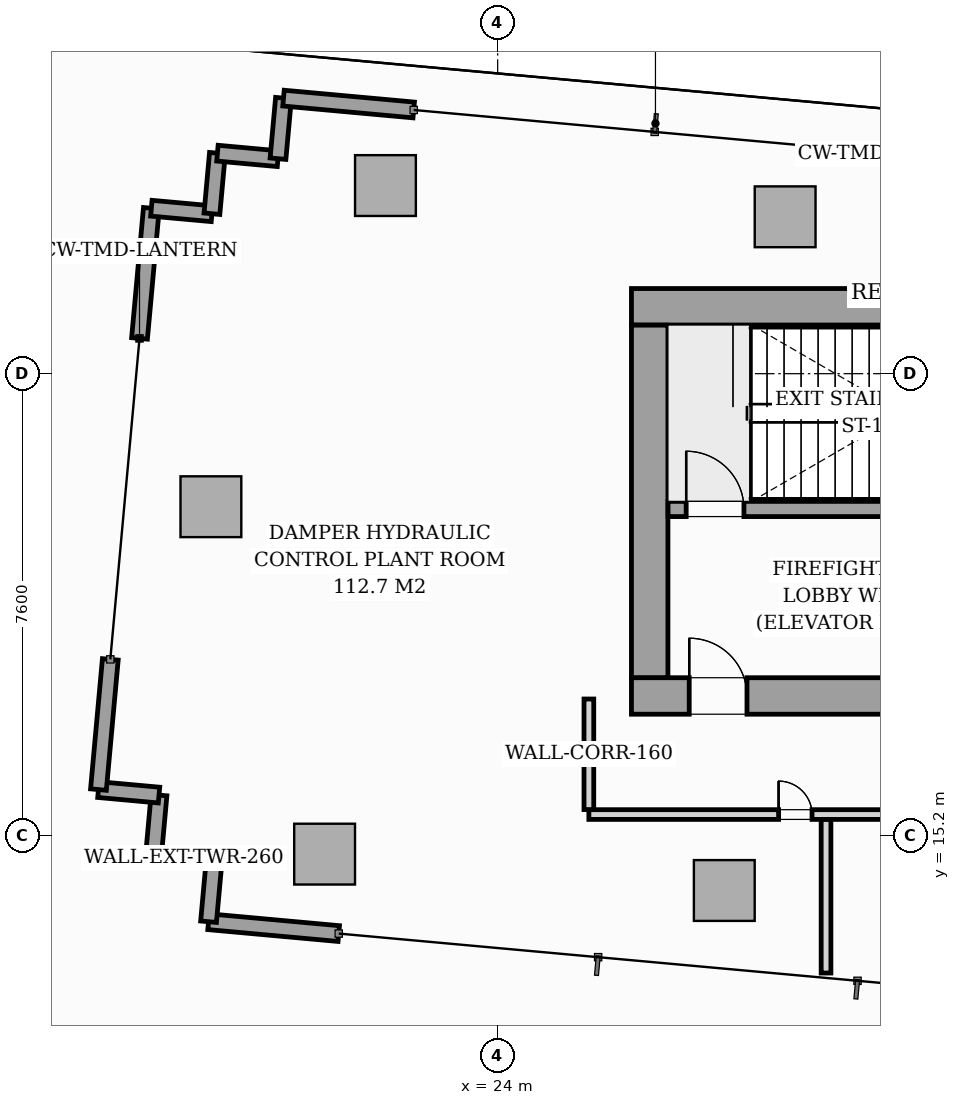
"""IFC4 building model, lengths in metres.
Left out: names, types, materials, properties, quantities, classifications, styles, units other than length and angle.
Written with IfcOpenShell. Run it as: python <this file> out.ifc"""

import sys

from ifc_helpers import new_model, si_unit, direction, frame, frame_2d, origin, origin_2d, place, context, subcontext, project, spatial, rectangle, i_section, extrude, source, transform, mapped, element, fill, save


model = new_model("IFC4")
c1 = context("Model", 3, precision=1e-05, world=origin(), true_north=direction((0.0, 1.0)))
c2 = subcontext(c1, "Body", "Model", "MODEL_VIEW")
j1 = project(units=[si_unit("LENGTHUNIT", "METRE"), si_unit("PLANEANGLEUNIT", "RADIAN")], contexts=[c1])
p1 = place(None, origin())
s1 = spatial("IfcSite", under=j1, at=p1, CompositionType="ELEMENT")
p2 = place(p1, origin())
s2 = spatial("IfcBuilding", under=s1, at=p2, CompositionType="ELEMENT")
p3 = place(p2, frame((0.0, 0.0, 264.3)))
s3 = spatial("IfcBuildingStorey", under=s2, at=p3, CompositionType="ELEMENT", Elevation=264.3)
m1 = source(origin(), c2, "Body", "SweptSolid", [
    extrude(i_section(OverallWidth=0.404, OverallDepth=0.407, WebThickness=0.027, FlangeThickness=0.044, FilletRadius=0.018, at=origin_2d()), origin(), (0.0, 0.0, 1.0), 6.496),
])
for number, where, z_axis, x_axis in (
    (1, (26.4, 17.4, 0.002), (0.0, 0.0, 1.0), (1.0, 0.0, 0.0)),
    (2, (26.4, 24.0, 0.002), (0.0, 0.0, 1.0), (1.0, 0.0, 0.0)),
):
    element("IfcColumn", number, at=place(p3, frame(where, z_axis=z_axis, x_axis=x_axis)), inside=s3, PredefinedType="PILASTER", context=c2, shape_type="MappedRepresentation", body=[
        mapped(m1, transform((0.0, 0.0, 0.0), scale=1.0)),
    ])
m2 = source(origin(), c2, "Body", "SweptSolid", [
    extrude(rectangle(XDim=1.0, YDim=1.0, at=origin_2d()), origin(), (0.0, 0.0, 1.0), 6.494),
])
for number, where, z_axis, x_axis in (
    (3, (21.154, 14.899, 0.004), (0.0, 0.0, 1.0), (0.996, -0.091, 0.0)),
    (4, (27.727, 14.301, 0.004), (0.0, 0.0, 1.0), (0.996, -0.091, 0.0)),
    (5, (22.155, 25.894, 0.004), (0.0, 0.0, 1.0), (0.996, -0.091, 0.0)),
    (6, (28.728, 25.38, 0.004), (0.0, 0.0, 1.0), (0.996, -0.091, 0.0)),
    (7, (19.284, 20.612, 0.004), (0.0, 0.0, 1.0), (0.996, -0.091, 0.0)),
):
    element("IfcColumn", number, at=place(p3, frame(where, z_axis=z_axis, x_axis=x_axis)), inside=s3, PredefinedType="COLUMN", context=c2, shape_type="MappedRepresentation", body=[
        mapped(m2, transform((0.0, 0.0, 0.0), scale=1.0)),
    ])
p4 = place(p3, frame((19.336, 14.783, 0.0), z_axis=(0.0, 0.0, 1.0), x_axis=(-0.995891205479, 0.090557754224, 0.0)))
e8 = element("IfcWall", 8, at=p4, inside=s3, PredefinedType="STANDARD", context=c2, shape_type="SweptSolid", body=[
    extrude(rectangle(XDim=1.0, YDim=0.26, at=frame_2d((0.5, 0.0))), origin(), (0.0, 0.0, 1.0), 6.2),
])
p5 = place(p3, frame((18.34, 14.874, 0.0), z_axis=(0.0, 0.0, 1.0), x_axis=(0.090821912176, 0.995867149909, 0.0)))
e9 = element("IfcWall", 9, at=p5, inside=s3, PredefinedType="STANDARD", context=c2, shape_type="SweptSolid", body=[
    extrude(rectangle(XDim=1.0, YDim=0.26, at=frame_2d((0.5, 0.0))), origin(), (0.0, 0.0, 1.0), 6.2),
])
p6 = place(p3, frame((18.431, 15.87, 0.0), z_axis=(0.0, 0.0, 1.0), x_axis=(-0.995891205479, 0.090557754224, 0.0)))
e10 = element("IfcWall", 10, at=p6, inside=s3, PredefinedType="STANDARD", context=c2, shape_type="SweptSolid", body=[
    extrude(rectangle(XDim=1.0, YDim=0.26, at=frame_2d((0.5, 0.0))), origin(), (0.0, 0.0, 1.0), 6.2),
])
p7 = place(p3, frame((17.435, 15.96, 0.0), z_axis=(0.0, 0.0, 1.0), x_axis=(0.090720017492, 0.995876437329, 0.0)))
e11 = element("IfcWall", 11, at=p7, inside=s3, PredefinedType="STANDARD", context=c2, shape_type="SweptSolid", body=[
    extrude(rectangle(XDim=2.15, YDim=0.26, at=frame_2d((1.075, 0.0))), origin(), (0.0, 0.0, 1.0), 6.2),
])
p8 = place(p3, frame((18.11, 23.38, 0.0), z_axis=(0.0, 0.0, 1.0), x_axis=(0.090617654952, 0.995885756807, 0.0)))
e12 = element("IfcWall", 12, at=p8, inside=s3, PredefinedType="STANDARD", context=c2, shape_type="SweptSolid", body=[
    extrude(rectangle(XDim=2.15, YDim=0.26, at=frame_2d((1.075, 0.0))), origin(), (0.0, 0.0, 1.0), 6.2),
])
for number, where, z_axis, x_axis in (
    (13, (18.305, 25.521, 0.0), (0.0, 0.0, 1.0), (0.996, -0.091, 0.0)),
    (14, (19.301, 25.43, 0.0), (0.0, 0.0, 1.0), (0.091, 0.996, 0.0)),
    (15, (19.392, 26.426, 0.0), (0.0, 0.0, 1.0), (0.996, -0.091, 0.0)),
    (16, (20.387, 26.336, 0.0), (0.0, 0.0, 1.0), (0.091, 0.996, 0.0)),
):
    element("IfcWall", number, at=place(p3, frame(where, z_axis=z_axis, x_axis=x_axis)), inside=s3, PredefinedType="STANDARD", context=c2, shape_type="SweptSolid", body=[
        extrude(rectangle(XDim=1.0, YDim=0.26, at=frame_2d((0.5, 0.0))), origin(), (0.0, 0.0, 1.0), 6.2),
    ])
p9 = place(p3, frame((20.478, 27.332, 0.0), z_axis=(0.0, 0.0, 1.0), x_axis=(0.995885756807, -0.090617654952, 0.0)))
e17 = element("IfcWall", 17, at=p9, inside=s3, PredefinedType="STANDARD", context=c2, shape_type="SweptSolid", body=[
    extrude(rectangle(XDim=2.15, YDim=0.26, at=frame_2d((1.075, 0.0))), origin(), (0.0, 0.0, 1.0), 6.2),
])
p10 = place(p3, frame((21.387, 13.593, 0.0), z_axis=(0.0, 0.0, 1.0), x_axis=(-0.995876437329, 0.090720017492, 0.0)))
e18 = element("IfcWall", 18, at=p10, inside=s3, PredefinedType="STANDARD", context=c2, shape_type="SweptSolid", body=[
    extrude(rectangle(XDim=2.15, YDim=0.26, at=frame_2d((1.075, 0.0))), origin(), (0.0, 0.0, 1.0), 6.2),
])
p11 = place(p3, frame((19.245, 13.788, 0.0), z_axis=(0.0, 0.0, 1.0), x_axis=(0.090821912176, 0.995867149909, 0.0)))
e19 = element("IfcWall", 19, at=p11, inside=s3, PredefinedType="STANDARD", context=c2, shape_type="SweptSolid", body=[
    extrude(rectangle(XDim=1.0, YDim=0.26, at=frame_2d((0.5, 0.0))), origin(), (0.0, 0.0, 1.0), 6.2),
])
p12 = place(p3, frame((26.2, 17.5, 0.0), z_axis=(0.0, 0.0, 1.0), x_axis=(1.0, 0.0, 0.0)))
e20 = element("IfcWall", 20, at=p12, inside=s3, PredefinedType="SHEAR", context=c2, shape_type="SweptSolid", body=[
    extrude(rectangle(XDim=19.6, YDim=0.6, at=frame_2d((9.8, 0.0))), origin(), (0.0, 0.0, 1.0), 6.5),
])
p13 = place(p12, frame((0.95, 0.0, 0.0)))
e21 = element("IfcOpeningElement", 21, at=p13, cuts=e20, PredefinedType="OPENING", context=c2, shape_type="SweptSolid", body=[
    extrude(rectangle(XDim=0.95, YDim=2.06, at=frame_2d((0.475, 1.03))), frame((0.0, 0.31, 0.0), z_axis=(0.0, -1.0, 0.0), x_axis=(1.0, 0.0, 0.0)), (0.0, 0.0, 1.0), 0.62),
])
p14 = place(p12, frame((9.38, 0.0, 0.0)))
e22 = element("IfcOpeningElement", 22, at=p14, cuts=e20, PredefinedType="OPENING", context=c2, shape_type="SweptSolid", body=[
    extrude(rectangle(XDim=0.9, YDim=2.06, at=frame_2d((0.45, 1.03))), frame((0.0, 0.31, 0.0), z_axis=(0.0, -1.0, 0.0), x_axis=(1.0, 0.0, 0.0)), (0.0, 0.0, 1.0), 0.62),
])
p15 = place(p12, frame((17.55, 0.0, 0.0)))
e23 = element("IfcOpeningElement", 23, at=p15, cuts=e20, PredefinedType="OPENING", context=c2, shape_type="SweptSolid", body=[
    extrude(rectangle(XDim=0.95, YDim=2.06, at=frame_2d((0.475, 1.03))), frame((0.0, 0.31, 0.0), z_axis=(0.0, -1.0, 0.0), x_axis=(1.0, 0.0, 0.0)), (0.0, 0.0, 1.0), 0.62),
])
p16 = place(p3, frame((26.2, 23.9, 0.0), z_axis=(0.0, 0.0, 1.0), x_axis=(1.0, 0.0, 0.0)))
e24 = element("IfcWall", 24, at=p16, inside=s3, PredefinedType="SHEAR", context=c2, shape_type="SweptSolid", body=[
    extrude(rectangle(XDim=19.6, YDim=0.6, at=frame_2d((9.8, 0.0))), origin(), (0.0, 0.0, 1.0), 6.5),
])
p17 = place(p3, frame((26.5, 17.802, 0.0), z_axis=(0.0, 0.0, 1.0), x_axis=(0.0, 1.0, 0.0)))
e25 = element("IfcWall", 25, at=p17, inside=s3, PredefinedType="SHEAR", context=c2, shape_type="SweptSolid", body=[
    extrude(rectangle(XDim=5.796, YDim=0.6, at=frame_2d((2.898, 0.0))), origin(), (0.0, 0.0, 1.0), 6.5),
])
p18 = place(p3, frame((26.802, 20.575, 0.0), z_axis=(0.0, 0.0, 1.0), x_axis=(1.0, 0.0, 0.0)))
e26 = element("IfcWall", 26, at=p18, inside=s3, PredefinedType="SOLIDWALL", context=c2, shape_type="SweptSolid", body=[
    extrude(rectangle(XDim=8.148, YDim=0.25, at=frame_2d((4.074, 0.0))), origin(), (0.0, 0.0, 1.0), 6.5),
])
p19 = place(p18, frame((0.298, 0.0, 0.0)))
e27 = element("IfcOpeningElement", 27, at=p19, cuts=e26, PredefinedType="OPENING", context=c2, shape_type="SweptSolid", body=[
    extrude(rectangle(XDim=0.95, YDim=2.06, at=frame_2d((0.475, 1.03))), frame((0.0, 0.135, 0.0), z_axis=(0.0, -1.0, 0.0), x_axis=(1.0, 0.0, 0.0)), (0.0, 0.0, 1.0), 0.27),
])
p20 = place(p3, frame((25.5, 15.55, 0.0), z_axis=(0.0, 0.0, 1.0), x_axis=(1.0, 0.0, 0.0)))
e28 = element("IfcWall", 28, at=p20, inside=s3, PredefinedType="PARTITIONING", context=c2, shape_type="SweptSolid", body=[
    extrude(rectangle(XDim=21.0, YDim=0.16, at=frame_2d((10.5, 0.0))), origin(), (0.0, 0.0, 1.0), 5.756),
])
p21 = place(p20, frame((3.12, 0.0, 0.0)))
e29 = element("IfcOpeningElement", 29, at=p21, cuts=e28, PredefinedType="OPENING", context=c2, shape_type="SweptSolid", body=[
    extrude(rectangle(XDim=0.55, YDim=2.02, at=frame_2d((0.275, 1.01))), frame((0.0, 0.09, 0.0), z_axis=(0.0, -1.0, 0.0), x_axis=(1.0, 0.0, 0.0)), (0.0, 0.0, 1.0), 0.18),
])
p22 = place(p20, frame((5.45, 0.0, 0.0)))
e30 = element("IfcOpeningElement", 30, at=p22, cuts=e28, PredefinedType="OPENING", context=c2, shape_type="SweptSolid", body=[
    extrude(rectangle(XDim=1.2, YDim=2.08, at=frame_2d((0.6, 1.04))), frame((0.0, 0.09, 0.0), z_axis=(0.0, -1.0, 0.0), x_axis=(1.0, 0.0, 0.0)), (0.0, 0.0, 1.0), 0.18),
])
p23 = place(p20, frame((17.1, 0.0, 0.0)))
e31 = element("IfcOpeningElement", 31, at=p23, cuts=e28, PredefinedType="OPENING", context=c2, shape_type="SweptSolid", body=[
    extrude(rectangle(XDim=1.2, YDim=2.08, at=frame_2d((0.6, 1.04))), frame((0.0, 0.09, 0.0), z_axis=(0.0, -1.0, 0.0), x_axis=(1.0, 0.0, 0.0)), (0.0, 0.0, 1.0), 0.18),
])
p24 = place(p3, frame((25.5, 15.632, 0.0), z_axis=(0.0, 0.0, 1.0), x_axis=(0.0, 1.0, 0.0)))
e32 = element("IfcWall", 32, at=p24, inside=s3, PredefinedType="PARTITIONING", context=c2, shape_type="SweptSolid", body=[
    extrude(rectangle(XDim=1.818, YDim=0.16, at=frame_2d((0.909, 0.0))), origin(), (0.0, 0.0, 1.0), 6.2),
])
p25 = place(p3, frame((29.4, 12.944, 0.0), z_axis=(0.0, 0.0, 1.0), x_axis=(0.0, 1.0, 0.0)))
e33 = element("IfcWall", 33, at=p25, inside=s3, PredefinedType="PARTITIONING", context=c2, shape_type="SweptSolid", body=[
    extrude(rectangle(XDim=2.524, YDim=0.16, at=frame_2d((1.262, 0.0))), origin(), (0.0, 0.0, 1.0), 6.2),
])
m3 = source(origin(), c2, "Body", "SweptSolid", [
    extrude(rectangle(XDim=0.95, YDim=2.06, at=frame_2d((0.475, 1.03))), frame((0.0, 0.025, 0.0), z_axis=(0.0, -1.0, 0.0), x_axis=(1.0, 0.0, 0.0)), (0.0, 0.0, 1.0), 0.05),
])
p26 = place(p13, origin())
e34 = element("IfcDoor", 34, at=p26, inside=s3, OperationType="SINGLE_SWING_LEFT", PredefinedType="DOOR", context=c2, shape_type="MappedRepresentation", body=[
    mapped(m3, transform((0.0, 0.0, 0.0), scale=1.0)),
])
fill(e21, e34)
p27 = place(p19, origin())
e35 = element("IfcDoor", 35, at=p27, inside=s3, OperationType="SINGLE_SWING_LEFT", PredefinedType="DOOR", context=c2, shape_type="MappedRepresentation", body=[
    mapped(m3, transform((0.0, 0.0, 0.0), scale=1.0)),
])
fill(e27, e35)
m4 = source(origin(), c2, "Body", "SweptSolid", [
    extrude(rectangle(XDim=0.55, YDim=2.02, at=frame_2d((0.275, 1.01))), frame((0.0, 0.025, 0.0), z_axis=(0.0, -1.0, 0.0), x_axis=(1.0, 0.0, 0.0)), (0.0, 0.0, 1.0), 0.05),
])
p28 = place(p21, origin())
e36 = element("IfcDoor", 36, at=p28, inside=s3, OperationType="SINGLE_SWING_LEFT", PredefinedType="DOOR", context=c2, shape_type="MappedRepresentation", body=[
    mapped(m4, transform((0.0, 0.0, 0.0), scale=1.0)),
])
fill(e29, e36)
save(model, sys.argv[1])
